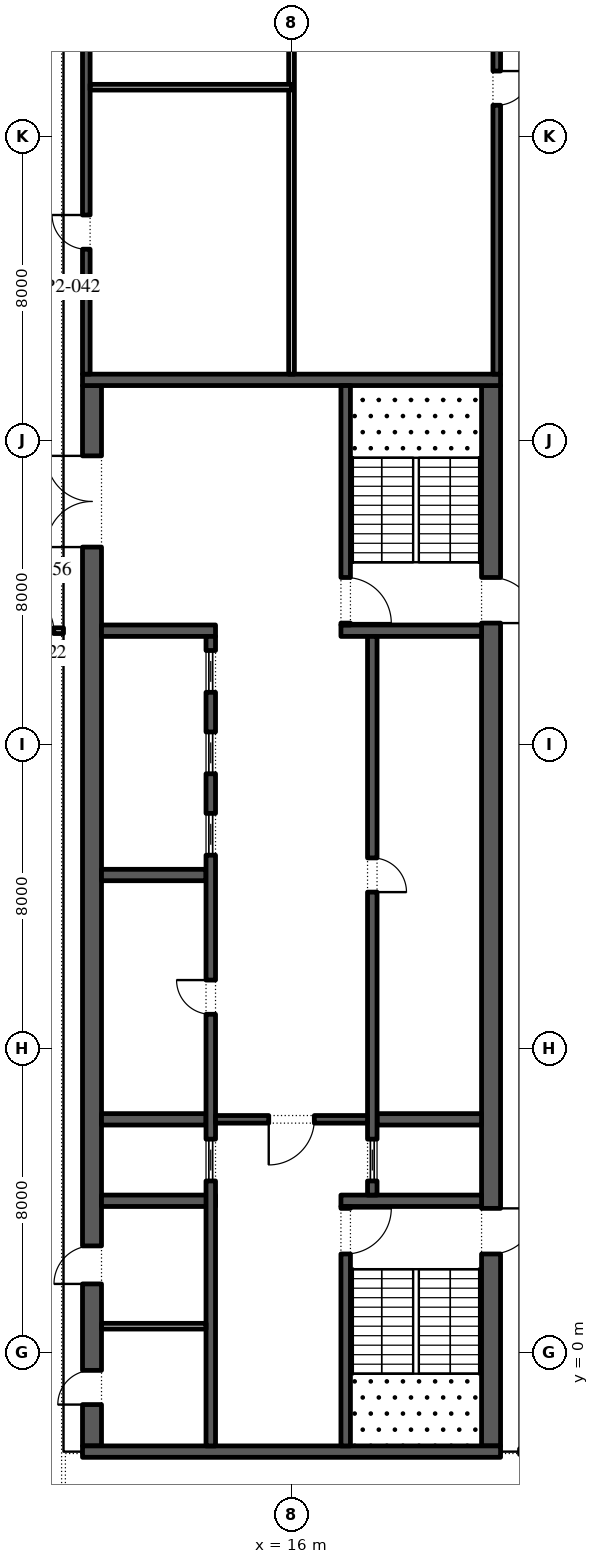
"""IFC4 building model, lengths in metres.
Left out: names, types, materials, properties, quantities, classifications, styles, units other than length and angle.
Written with IfcOpenShell. Run it as: python <this file> out.ifc"""

import sys

from ifc_helpers import new_model, si_unit, direction, frame, frame_2d, origin, place, context, subcontext, project, spatial, rectangle, extrude, element, fill, save


model = new_model("IFC4")
c1 = context("Model", 3, precision=1e-05, world=origin(), true_north=direction((0.0, 1.0)))
c2 = subcontext(c1, "Body", "Model", "MODEL_VIEW")
j1 = project(units=[si_unit("LENGTHUNIT", "METRE"), si_unit("PLANEANGLEUNIT", "RADIAN")], contexts=[c1])
p1 = place(None, origin())
s1 = spatial("IfcSite", under=j1, at=p1, CompositionType="ELEMENT")
p2 = place(p1, origin())
s2 = spatial("IfcBuilding", under=s1, at=p2, CompositionType="ELEMENT")
p3 = place(p2, frame((0.0, 0.0, 342.6)))
s3 = spatial("IfcBuildingStorey", under=s2, at=p3, CompositionType="ELEMENT", Elevation=342.6)
p4 = place(p3, frame((21.25, -2.45, 0.0), z_axis=(0.0, 0.0, 1.0), x_axis=(0.0, 1.0, 0.0)))
e1 = element("IfcWall", 1, at=p4, inside=s3, PredefinedType="SHEAR", context=c2, shape_type="SweptSolid", body=[
    extrude(rectangle(XDim=27.9, YDim=0.5, at=frame_2d((13.95, 0.0))), origin(), (0.0, 0.0, 1.0), 4.0),
])
p5 = place(p4, frame((5.05, 0.0, 0.0)))
e2 = element("IfcOpeningElement", 2, at=p5, cuts=e1, PredefinedType="OPENING", context=c2, shape_type="SweptSolid", body=[
    extrude(rectangle(XDim=1.2, YDim=2.1, at=frame_2d((0.6, 1.05))), frame((0.0, 0.26, 0.0), z_axis=(0.0, -1.0, 0.0), x_axis=(1.0, 0.0, 0.0)), (0.0, 0.0, 1.0), 0.52),
])
p6 = place(p4, frame((21.65, 0.0, 0.0)))
e3 = element("IfcOpeningElement", 3, at=p6, cuts=e1, PredefinedType="OPENING", context=c2, shape_type="SweptSolid", body=[
    extrude(rectangle(XDim=1.2, YDim=2.1, at=frame_2d((0.6, 1.05))), frame((0.0, 0.26, 0.0), z_axis=(0.0, -1.0, 0.0), x_axis=(1.0, 0.0, 0.0)), (0.0, 0.0, 1.0), 0.52),
])
p7 = place(p3, frame((10.75, -2.45, 0.0), z_axis=(0.0, 0.0, 1.0), x_axis=(0.0, 1.0, 0.0)))
e4 = element("IfcWall", 4, at=p7, inside=s3, PredefinedType="SHEAR", context=c2, shape_type="SweptSolid", body=[
    extrude(rectangle(XDim=27.9, YDim=0.5, at=frame_2d((13.95, 0.0))), origin(), (0.0, 0.0, 1.0), 4.0),
])
p8 = place(p7, frame((23.65, 0.0, 0.0)))
e5 = element("IfcOpeningElement", 5, at=p8, cuts=e4, PredefinedType="OPENING", context=c2, shape_type="SweptSolid", body=[
    extrude(rectangle(XDim=2.4, YDim=2.1, at=frame_2d((1.2, 1.05))), frame((0.0, 0.26, 0.0), z_axis=(0.0, -1.0, 0.0), x_axis=(1.0, 0.0, 0.0)), (0.0, 0.0, 1.0), 0.52),
])
p9 = place(p7, frame((1.087, 0.0, 0.0)))
e6 = element("IfcOpeningElement", 6, at=p9, cuts=e4, PredefinedType="OPENING", context=c2, shape_type="SweptSolid", body=[
    extrude(rectangle(XDim=0.9, YDim=2.1, at=frame_2d((0.45, 1.05))), frame((0.0, 0.26, 0.0), z_axis=(0.0, -1.0, 0.0), x_axis=(1.0, 0.0, 0.0)), (0.0, 0.0, 1.0), 0.52),
])
p10 = place(p7, frame((4.262, 0.0, 0.0)))
e7 = element("IfcOpeningElement", 7, at=p10, cuts=e4, PredefinedType="OPENING", context=c2, shape_type="SweptSolid", body=[
    extrude(rectangle(XDim=1.0, YDim=2.1, at=frame_2d((0.5, 1.05))), frame((0.0, 0.26, 0.0), z_axis=(0.0, -1.0, 0.0), x_axis=(1.0, 0.0, 0.0)), (0.0, 0.0, 1.0), 0.52),
])
for number, where, z_axis, x_axis in (
    (8, (10.5, -2.6, 0.0), (0.0, 0.0, 1.0), (1.0, 0.0, 0.0)),
    (9, (10.5, 25.6, 0.0), (0.0, 0.0, 1.0), (1.0, 0.0, 0.0)),
):
    element("IfcWall", number, at=place(p3, frame(where, z_axis=z_axis, x_axis=x_axis)), inside=s3, PredefinedType="SHEAR", context=c2, shape_type="SweptSolid", body=[
        extrude(rectangle(XDim=11.0, YDim=0.3, at=frame_2d((5.5, 0.0))), origin(), (0.0, 0.0, 1.0), 4.0),
    ])
p11 = place(p3, frame((17.3, 4.0, 0.0), z_axis=(0.0, 0.0, 1.0), x_axis=(1.0, 0.0, 0.0)))
e10 = element("IfcWall", 10, at=p11, inside=s3, PredefinedType="SHEAR", context=c2, shape_type="SweptSolid", body=[
    extrude(rectangle(XDim=3.7, YDim=0.3, at=frame_2d((1.85, 0.0))), origin(), (0.0, 0.0, 1.0), 4.0),
])
p12 = place(p3, frame((17.425, -2.45, 0.0), z_axis=(0.0, 0.0, 1.0), x_axis=(0.0, 1.0, 0.0)))
e11 = element("IfcWall", 11, at=p12, inside=s3, PredefinedType="SHEAR", context=c2, shape_type="SweptSolid", body=[
    extrude(rectangle(XDim=6.3, YDim=0.25, at=frame_2d((3.15, 0.0))), origin(), (0.0, 0.0, 1.0), 4.0),
])
p13 = place(p12, frame((5.05, 0.0, 0.0)))
e12 = element("IfcOpeningElement", 12, at=p13, cuts=e11, PredefinedType="OPENING", context=c2, shape_type="SweptSolid", body=[
    extrude(rectangle(XDim=1.2, YDim=2.1, at=frame_2d((0.6, 1.05))), frame((0.0, 0.135, 0.0), z_axis=(0.0, -1.0, 0.0), x_axis=(1.0, 0.0, 0.0)), (0.0, 0.0, 1.0), 0.27),
])
p14 = place(p3, frame((17.3, 19.0, 0.0), z_axis=(0.0, 0.0, 1.0), x_axis=(1.0, 0.0, 0.0)))
e13 = element("IfcWall", 13, at=p14, inside=s3, PredefinedType="SHEAR", context=c2, shape_type="SweptSolid", body=[
    extrude(rectangle(XDim=3.7, YDim=0.3, at=frame_2d((1.85, 0.0))), origin(), (0.0, 0.0, 1.0), 4.0),
])
p15 = place(p3, frame((17.425, 19.15, 0.0), z_axis=(0.0, 0.0, 1.0), x_axis=(0.0, 1.0, 0.0)))
e14 = element("IfcWall", 14, at=p15, inside=s3, PredefinedType="SHEAR", context=c2, shape_type="SweptSolid", body=[
    extrude(rectangle(XDim=6.3, YDim=0.25, at=frame_2d((3.15, 0.0))), origin(), (0.0, 0.0, 1.0), 4.0),
])
p16 = place(p15, frame((0.05, 0.0, 0.0)))
e15 = element("IfcOpeningElement", 15, at=p16, cuts=e14, PredefinedType="OPENING", context=c2, shape_type="SweptSolid", body=[
    extrude(rectangle(XDim=1.2, YDim=2.1, at=frame_2d((0.6, 1.05))), frame((0.0, 0.135, 0.0), z_axis=(0.0, -1.0, 0.0), x_axis=(1.0, 0.0, 0.0)), (0.0, 0.0, 1.0), 0.27),
])
p17 = place(p3, frame((18.25, 6.143, 0.0), z_axis=(0.0, 0.0, 1.0), x_axis=(1.0, 0.0, 0.0)))
e16 = element("IfcWall", 16, at=p17, inside=s3, PredefinedType="SHEAR", context=c2, shape_type="SweptSolid", body=[
    extrude(rectangle(XDim=2.75, YDim=0.3, at=frame_2d((1.375, 0.0))), origin(), (0.0, 0.0, 1.0), 4.0),
])
p18 = place(p3, frame((18.125, 4.15, 0.0), z_axis=(0.0, 0.0, 1.0), x_axis=(0.0, 1.0, 0.0)))
e17 = element("IfcWall", 17, at=p18, inside=s3, PredefinedType="SHEAR", context=c2, shape_type="SweptSolid", body=[
    extrude(rectangle(XDim=14.7, YDim=0.25, at=frame_2d((7.35, 0.0))), origin(), (0.0, 0.0, 1.0), 4.0),
])
p19 = place(p18, frame((7.971, 0.0, 0.0)))
e18 = element("IfcOpeningElement", 18, at=p19, cuts=e17, PredefinedType="OPENING", context=c2, shape_type="SweptSolid", body=[
    extrude(rectangle(XDim=0.9, YDim=2.1, at=frame_2d((0.45, 1.05))), frame((0.0, 0.135, 0.0), z_axis=(0.0, -1.0, 0.0), x_axis=(1.0, 0.0, 0.0)), (0.0, 0.0, 1.0), 0.27),
])
p20 = place(p18, frame((0.371, 0.0, 0.0)))
e19 = element("IfcOpeningElement", 19, at=p20, cuts=e17, PredefinedType="OPENING", context=c2, shape_type="SweptSolid", body=[
    extrude(rectangle(XDim=1.1, YDim=2.1, at=frame_2d((0.55, 1.05))), frame((0.0, 0.135, 0.0), z_axis=(0.0, -1.0, 0.0), x_axis=(1.0, 0.0, 0.0)), (0.0, 0.0, 1.0), 0.27),
])
p21 = place(p3, frame((11.0, 4.0, 0.0), z_axis=(0.0, 0.0, 1.0), x_axis=(1.0, 0.0, 0.0)))
e20 = element("IfcWall", 20, at=p21, inside=s3, PredefinedType="SHEAR", context=c2, shape_type="SweptSolid", body=[
    extrude(rectangle(XDim=3.0, YDim=0.3, at=frame_2d((1.5, 0.0))), origin(), (0.0, 0.0, 1.0), 4.0),
])
for number, where, z_axis, x_axis in (
    (21, (11.0, 6.143, 0.0), (0.0, 0.0, 1.0), (1.0, 0.0, 0.0)),
    (22, (11.0, 12.571, 0.0), (0.0, 0.0, 1.0), (1.0, 0.0, 0.0)),
):
    element("IfcWall", number, at=place(p3, frame(where, z_axis=z_axis, x_axis=x_axis)), inside=s3, PredefinedType="SHEAR", context=c2, shape_type="SweptSolid", body=[
        extrude(rectangle(XDim=2.75, YDim=0.3, at=frame_2d((1.375, 0.0))), origin(), (0.0, 0.0, 1.0), 4.0),
    ])
p22 = place(p3, frame((11.0, 19.0, 0.0), z_axis=(0.0, 0.0, 1.0), x_axis=(1.0, 0.0, 0.0)))
e23 = element("IfcWall", 23, at=p22, inside=s3, PredefinedType="SHEAR", context=c2, shape_type="SweptSolid", body=[
    extrude(rectangle(XDim=3.0, YDim=0.3, at=frame_2d((1.5, 0.0))), origin(), (0.0, 0.0, 1.0), 4.0),
])
p23 = place(p3, frame((13.875, -2.45, 0.0), z_axis=(0.0, 0.0, 1.0), x_axis=(0.0, 1.0, 0.0)))
e24 = element("IfcWall", 24, at=p23, inside=s3, PredefinedType="SHEAR", context=c2, shape_type="SweptSolid", body=[
    extrude(rectangle(XDim=21.3, YDim=0.25, at=frame_2d((10.65, 0.0))), origin(), (0.0, 0.0, 1.0), 4.0),
])
p24 = place(p23, frame((11.357, 0.0, 0.0)))
e25 = element("IfcOpeningElement", 25, at=p24, cuts=e24, PredefinedType="OPENING", context=c2, shape_type="SweptSolid", body=[
    extrude(rectangle(XDim=0.9, YDim=2.1, at=frame_2d((0.45, 1.05))), frame((0.0, 0.135, 0.0), z_axis=(0.0, -1.0, 0.0), x_axis=(1.0, 0.0, 0.0)), (0.0, 0.0, 1.0), 0.27),
])
p25 = place(p23, frame((6.971, 0.0, 0.0)))
e26 = element("IfcOpeningElement", 26, at=p25, cuts=e24, PredefinedType="OPENING", context=c2, shape_type="SweptSolid", body=[
    extrude(rectangle(XDim=1.1, YDim=2.1, at=frame_2d((0.55, 1.05))), frame((0.0, 0.135, 0.0), z_axis=(0.0, -1.0, 0.0), x_axis=(1.0, 0.0, 0.0)), (0.0, 0.0, 1.0), 0.27),
])
p26 = place(p23, frame((15.543, 0.0, 0.0)))
e27 = element("IfcOpeningElement", 27, at=p26, cuts=e24, PredefinedType="OPENING", context=c2, shape_type="SweptSolid", body=[
    extrude(rectangle(XDim=1.1, YDim=2.1, at=frame_2d((0.55, 1.05))), frame((0.0, 0.135, 0.0), z_axis=(0.0, -1.0, 0.0), x_axis=(1.0, 0.0, 0.0)), (0.0, 0.0, 1.0), 0.27),
])
p27 = place(p23, frame((17.686, 0.0, 0.0)))
e28 = element("IfcOpeningElement", 28, at=p27, cuts=e24, PredefinedType="OPENING", context=c2, shape_type="SweptSolid", body=[
    extrude(rectangle(XDim=1.1, YDim=2.1, at=frame_2d((0.55, 1.05))), frame((0.0, 0.135, 0.0), z_axis=(0.0, -1.0, 0.0), x_axis=(1.0, 0.0, 0.0)), (0.0, 0.0, 1.0), 0.27),
])
p28 = place(p23, frame((19.829, 0.0, 0.0)))
e29 = element("IfcOpeningElement", 29, at=p28, cuts=e24, PredefinedType="OPENING", context=c2, shape_type="SweptSolid", body=[
    extrude(rectangle(XDim=1.1, YDim=2.1, at=frame_2d((0.55, 1.05))), frame((0.0, 0.135, 0.0), z_axis=(0.0, -1.0, 0.0), x_axis=(1.0, 0.0, 0.0)), (0.0, 0.0, 1.0), 0.27),
])
p29 = place(p3, frame((14.0, 6.143, 0.0), z_axis=(0.0, 0.0, 1.0), x_axis=(1.0, 0.0, 0.0)))
e30 = element("IfcWall", 30, at=p29, inside=s3, PredefinedType="SHEAR", context=c2, shape_type="SweptSolid", body=[
    extrude(rectangle(XDim=4.0, YDim=0.2, at=frame_2d((2.0, 0.0))), origin(), (0.0, 0.0, 1.0), 4.0),
])
p30 = place(p29, frame((1.4, 0.0, 0.0)))
e31 = element("IfcOpeningElement", 31, at=p30, cuts=e30, PredefinedType="OPENING", context=c2, shape_type="SweptSolid", body=[
    extrude(rectangle(XDim=1.2, YDim=2.1, at=frame_2d((0.6, 1.05))), frame((0.0, 0.11, 0.0), z_axis=(0.0, -1.0, 0.0), x_axis=(1.0, 0.0, 0.0)), (0.0, 0.0, 1.0), 0.22),
])
p31 = place(p3, frame((11.0, 0.7, 0.0), z_axis=(0.0, 0.0, 1.0), x_axis=(1.0, 0.0, 0.0)))
e32 = element("IfcWall", 32, at=p31, inside=s3, PredefinedType="PARTITIONING", context=c2, shape_type="SweptSolid", body=[
    extrude(rectangle(XDim=2.75, YDim=0.15, at=frame_2d((1.375, 0.0))), origin(), (0.0, 0.0, 1.0), 4.0),
])
p32 = place(p3, frame((21.4, 25.75, 0.0), z_axis=(0.0, 0.0, 1.0), x_axis=(0.0, 1.0, 0.0)))
e33 = element("IfcWall", 33, at=p32, inside=s3, PredefinedType="SHEAR", context=c2, shape_type="SweptSolid", body=[
    extrude(rectangle(XDim=15.05, YDim=0.2, at=frame_2d((7.525, 0.0))), origin(), (0.0, 0.0, 1.0), 4.0),
])
p33 = place(p32, frame((7.075, 0.0, 0.0)))
e34 = element("IfcOpeningElement", 34, at=p33, cuts=e33, PredefinedType="OPENING", context=c2, shape_type="SweptSolid", body=[
    extrude(rectangle(XDim=0.9, YDim=2.1, at=frame_2d((0.45, 1.05))), frame((0.0, 0.11, 0.0), z_axis=(0.0, -1.0, 0.0), x_axis=(1.0, 0.0, 0.0)), (0.0, 0.0, 1.0), 0.22),
])
p34 = place(p3, frame((10.6, 25.75, 0.0), z_axis=(0.0, 0.0, 1.0), x_axis=(0.0, 1.0, 0.0)))
e35 = element("IfcWall", 35, at=p34, inside=s3, PredefinedType="SHEAR", context=c2, shape_type="SweptSolid", body=[
    extrude(rectangle(XDim=15.05, YDim=0.2, at=frame_2d((7.525, 0.0))), origin(), (0.0, 0.0, 1.0), 4.0),
])
p35 = place(p34, frame((3.288, 0.0, 0.0)))
e36 = element("IfcOpeningElement", 36, at=p35, cuts=e35, PredefinedType="OPENING", context=c2, shape_type="SweptSolid", body=[
    extrude(rectangle(XDim=0.9, YDim=2.1, at=frame_2d((0.45, 1.05))), frame((0.0, 0.11, 0.0), z_axis=(0.0, -1.0, 0.0), x_axis=(1.0, 0.0, 0.0)), (0.0, 0.0, 1.0), 0.22),
])
p36 = place(p34, frame((10.887, 0.0, 0.0)))
e37 = element("IfcOpeningElement", 37, at=p36, cuts=e35, PredefinedType="OPENING", context=c2, shape_type="SweptSolid", body=[
    extrude(rectangle(XDim=0.9, YDim=2.1, at=frame_2d((0.45, 1.05))), frame((0.0, 0.11, 0.0), z_axis=(0.0, -1.0, 0.0), x_axis=(1.0, 0.0, 0.0)), (0.0, 0.0, 1.0), 0.22),
])
p37 = place(p3, frame((16.0, 25.75, 0.0), z_axis=(0.0, 0.0, 1.0), x_axis=(0.0, 1.0, 0.0)))
e38 = element("IfcWall", 38, at=p37, inside=s3, PredefinedType="PARTITIONING", context=c2, shape_type="SweptSolid", body=[
    extrude(rectangle(XDim=15.05, YDim=0.15, at=frame_2d((7.525, 0.0))), origin(), (0.0, 0.0, 1.0), 4.0),
])
p38 = place(p3, frame((10.7, 33.3, 0.0), z_axis=(0.0, 0.0, 1.0), x_axis=(1.0, 0.0, 0.0)))
e39 = element("IfcWall", 39, at=p38, inside=s3, PredefinedType="PARTITIONING", context=c2, shape_type="SweptSolid", body=[
    extrude(rectangle(XDim=5.3, YDim=0.15, at=frame_2d((2.65, 0.0))), origin(), (0.0, 0.0, 1.0), 4.0),
])
p39 = place(p3, frame((8.485, 19.0, 0.0), z_axis=(0.0, 0.0, 1.0), x_axis=(1.0, 0.0, 0.0)))
e40 = element("IfcWall", 40, at=p39, inside=s3, PredefinedType="PARTITIONING", context=c2, shape_type="SweptSolid", body=[
    extrude(rectangle(XDim=1.515, YDim=0.15, at=frame_2d((0.757, 0.0))), origin(), (0.0, 0.0, 1.0), 4.0),
])
p40 = place(p39, frame((0.258, 0.0, 0.0)))
e41 = element("IfcOpeningElement", 41, at=p40, cuts=e40, PredefinedType="OPENING", context=c2, shape_type="SweptSolid", body=[
    extrude(rectangle(XDim=1.0, YDim=2.1, at=frame_2d((0.5, 1.05))), frame((0.0, 0.085, 0.0), z_axis=(0.0, -1.0, 0.0), x_axis=(1.0, 0.0, 0.0)), (0.0, 0.0, 1.0), 0.17),
])
p41 = place(p19, frame((0.9, -0.2, 0.0), z_axis=(0.0, 0.0, 1.0), x_axis=(-1.0, 0.0, 0.0)))
e42 = element("IfcDoor", 42, at=p41, inside=s3, OperationType="SINGLE_SWING_LEFT", PredefinedType="DOOR", context=c2, shape_type="SweptSolid", body=[
    extrude(rectangle(XDim=0.9, YDim=2.1, at=frame_2d((0.45, 1.05))), frame((0.0, -0.075, 0.0), z_axis=(0.0, -1.0, 0.0), x_axis=(1.0, 0.0, 0.0)), (0.0, 0.0, 1.0), 0.05),
])
fill(e18, e42)
p42 = place(p20, origin())
e43 = element("IfcDoor", 43, at=p42, inside=s3, OperationType="SLIDING_TO_LEFT", PredefinedType="DOOR", context=c2, shape_type="SweptSolid", body=[
    extrude(rectangle(XDim=1.1, YDim=2.1, at=frame_2d((0.55, 1.05))), frame((0.0, 0.025, 0.0), z_axis=(0.0, -1.0, 0.0), x_axis=(1.0, 0.0, 0.0)), (0.0, 0.0, 1.0), 0.05),
])
fill(e19, e43)
p43 = place(p24, origin())
e44 = element("IfcDoor", 44, at=p43, inside=s3, OperationType="SINGLE_SWING_LEFT", PredefinedType="DOOR", context=c2, shape_type="SweptSolid", body=[
    extrude(rectangle(XDim=0.9, YDim=2.1, at=frame_2d((0.45, 1.05))), frame((0.0, 0.125, 0.0), z_axis=(0.0, -1.0, 0.0), x_axis=(1.0, 0.0, 0.0)), (0.0, 0.0, 1.0), 0.05),
])
fill(e25, e44)
p44 = place(p25, origin())
e45 = element("IfcDoor", 45, at=p44, inside=s3, OperationType="SLIDING_TO_LEFT", PredefinedType="DOOR", context=c2, shape_type="SweptSolid", body=[
    extrude(rectangle(XDim=1.1, YDim=2.1, at=frame_2d((0.55, 1.05))), frame((0.0, 0.025, 0.0), z_axis=(0.0, -1.0, 0.0), x_axis=(1.0, 0.0, 0.0)), (0.0, 0.0, 1.0), 0.05),
])
fill(e26, e45)
p45 = place(p26, origin())
e46 = element("IfcDoor", 46, at=p45, inside=s3, OperationType="SLIDING_TO_LEFT", PredefinedType="DOOR", context=c2, shape_type="SweptSolid", body=[
    extrude(rectangle(XDim=1.1, YDim=2.1, at=frame_2d((0.55, 1.05))), frame((0.0, 0.025, 0.0), z_axis=(0.0, -1.0, 0.0), x_axis=(1.0, 0.0, 0.0)), (0.0, 0.0, 1.0), 0.05),
])
fill(e27, e46)
p46 = place(p27, origin())
e47 = element("IfcDoor", 47, at=p46, inside=s3, OperationType="SLIDING_TO_LEFT", PredefinedType="DOOR", context=c2, shape_type="SweptSolid", body=[
    extrude(rectangle(XDim=1.1, YDim=2.1, at=frame_2d((0.55, 1.05))), frame((0.0, 0.025, 0.0), z_axis=(0.0, -1.0, 0.0), x_axis=(1.0, 0.0, 0.0)), (0.0, 0.0, 1.0), 0.05),
])
fill(e28, e47)
p47 = place(p28, origin())
e48 = element("IfcDoor", 48, at=p47, inside=s3, OperationType="SLIDING_TO_LEFT", PredefinedType="DOOR", context=c2, shape_type="SweptSolid", body=[
    extrude(rectangle(XDim=1.1, YDim=2.1, at=frame_2d((0.55, 1.05))), frame((0.0, 0.025, 0.0), z_axis=(0.0, -1.0, 0.0), x_axis=(1.0, 0.0, 0.0)), (0.0, 0.0, 1.0), 0.05),
])
fill(e29, e48)
p48 = place(p30, frame((1.2, 0.0, 0.0), z_axis=(0.0, 0.0, 1.0), x_axis=(-1.0, 0.0, 0.0)))
e49 = element("IfcDoor", 49, at=p48, inside=s3, OperationType="SINGLE_SWING_LEFT", PredefinedType="DOOR", context=c2, shape_type="SweptSolid", body=[
    extrude(rectangle(XDim=1.2, YDim=2.1, at=frame_2d((0.6, 1.05))), frame((0.0, 0.025, 0.0), z_axis=(0.0, -1.0, 0.0), x_axis=(1.0, 0.0, 0.0)), (0.0, 0.0, 1.0), 0.05),
])
fill(e31, e49)
p49 = place(p8, origin())
e50 = element("IfcDoor", 50, at=p49, inside=s3, OperationType="DOUBLE_DOOR_SINGLE_SWING", PredefinedType="DOOR", context=c2, shape_type="SweptSolid", body=[
    extrude(rectangle(XDim=2.4, YDim=2.1, at=frame_2d((1.2, 1.05))), frame((0.0, 0.025, 0.0), z_axis=(0.0, -1.0, 0.0), x_axis=(1.0, 0.0, 0.0)), (0.0, 0.0, 1.0), 0.05),
])
fill(e5, e50)
p50 = place(p13, frame((1.2, 0.0, 0.0), z_axis=(0.0, 0.0, 1.0), x_axis=(-1.0, 0.0, 0.0)))
e51 = element("IfcDoor", 51, at=p50, inside=s3, OperationType="SINGLE_SWING_RIGHT", PredefinedType="DOOR", context=c2, shape_type="SweptSolid", body=[
    extrude(rectangle(XDim=1.2, YDim=2.1, at=frame_2d((0.6, 1.05))), frame((0.0, 0.025, 0.0), z_axis=(0.0, -1.0, 0.0), x_axis=(1.0, 0.0, 0.0)), (0.0, 0.0, 1.0), 0.05),
])
fill(e12, e51)
p51 = place(p5, frame((1.2, 0.0, 0.0), z_axis=(0.0, 0.0, 1.0), x_axis=(-1.0, 0.0, 0.0)))
e52 = element("IfcDoor", 52, at=p51, inside=s3, OperationType="SINGLE_SWING_RIGHT", PredefinedType="DOOR", context=c2, shape_type="SweptSolid", body=[
    extrude(rectangle(XDim=1.2, YDim=2.1, at=frame_2d((0.6, 1.05))), frame((0.0, 0.025, 0.0), z_axis=(0.0, -1.0, 0.0), x_axis=(1.0, 0.0, 0.0)), (0.0, 0.0, 1.0), 0.05),
])
fill(e2, e52)
p52 = place(p16, frame((1.2, 0.0, 0.0), z_axis=(0.0, 0.0, 1.0), x_axis=(-1.0, 0.0, 0.0)))
e53 = element("IfcDoor", 53, at=p52, inside=s3, OperationType="SINGLE_SWING_LEFT", PredefinedType="DOOR", context=c2, shape_type="SweptSolid", body=[
    extrude(rectangle(XDim=1.2, YDim=2.1, at=frame_2d((0.6, 1.05))), frame((0.0, 0.025, 0.0), z_axis=(0.0, -1.0, 0.0), x_axis=(1.0, 0.0, 0.0)), (0.0, 0.0, 1.0), 0.05),
])
fill(e15, e53)
p53 = place(p6, frame((1.2, 0.0, 0.0), z_axis=(0.0, 0.0, 1.0), x_axis=(-1.0, 0.0, 0.0)))
e54 = element("IfcDoor", 54, at=p53, inside=s3, OperationType="SINGLE_SWING_LEFT", PredefinedType="DOOR", context=c2, shape_type="SweptSolid", body=[
    extrude(rectangle(XDim=1.2, YDim=2.1, at=frame_2d((0.6, 1.05))), frame((0.0, 0.025, 0.0), z_axis=(0.0, -1.0, 0.0), x_axis=(1.0, 0.0, 0.0)), (0.0, 0.0, 1.0), 0.05),
])
fill(e3, e54)
p54 = place(p9, origin())
e55 = element("IfcDoor", 55, at=p54, inside=s3, OperationType="SINGLE_SWING_RIGHT", PredefinedType="DOOR", context=c2, shape_type="SweptSolid", body=[
    extrude(rectangle(XDim=0.9, YDim=2.1, at=frame_2d((0.45, 1.05))), frame((0.0, -0.2, 0.0), z_axis=(0.0, -1.0, 0.0), x_axis=(1.0, 0.0, 0.0)), (0.0, 0.0, 1.0), 0.05),
])
fill(e6, e55)
p55 = place(p10, origin())
e56 = element("IfcDoor", 56, at=p55, inside=s3, OperationType="SINGLE_SWING_RIGHT", PredefinedType="DOOR", context=c2, shape_type="SweptSolid", body=[
    extrude(rectangle(XDim=1.0, YDim=2.1, at=frame_2d((0.5, 1.05))), frame((0.0, -0.2, 0.0), z_axis=(0.0, -1.0, 0.0), x_axis=(1.0, 0.0, 0.0)), (0.0, 0.0, 1.0), 0.05),
])
fill(e7, e56)
p56 = place(p33, frame((0.9, 0.15, 0.0), z_axis=(0.0, 0.0, 1.0), x_axis=(-1.0, 0.0, 0.0)))
e57 = element("IfcDoor", 57, at=p56, inside=s3, OperationType="SINGLE_SWING_RIGHT", PredefinedType="DOOR", context=c2, shape_type="SweptSolid", body=[
    extrude(rectangle(XDim=0.9, YDim=2.1, at=frame_2d((0.45, 1.05))), frame((0.0, 0.1, 0.0), z_axis=(0.0, -1.0, 0.0), x_axis=(1.0, 0.0, 0.0)), (0.0, 0.0, 1.0), 0.05),
])
fill(e34, e57)
p57 = place(p35, origin())
e58 = element("IfcDoor", 58, at=p57, inside=s3, OperationType="SINGLE_SWING_LEFT", PredefinedType="DOOR", context=c2, shape_type="SweptSolid", body=[
    extrude(rectangle(XDim=0.9, YDim=2.1, at=frame_2d((0.45, 1.05))), frame((0.0, -0.05, 0.0), z_axis=(0.0, -1.0, 0.0), x_axis=(1.0, 0.0, 0.0)), (0.0, 0.0, 1.0), 0.05),
])
fill(e36, e58)
p58 = place(p40, origin())
e59 = element("IfcDoor", 59, at=p58, inside=s3, OperationType="SINGLE_SWING_RIGHT", PredefinedType="DOOR", context=c2, shape_type="SweptSolid", body=[
    extrude(rectangle(XDim=1.0, YDim=2.1, at=frame_2d((0.5, 1.05))), frame((0.0, 0.025, 0.0), z_axis=(0.0, -1.0, 0.0), x_axis=(1.0, 0.0, 0.0)), (0.0, 0.0, 1.0), 0.05),
])
fill(e41, e59)
save(model, sys.argv[1])
